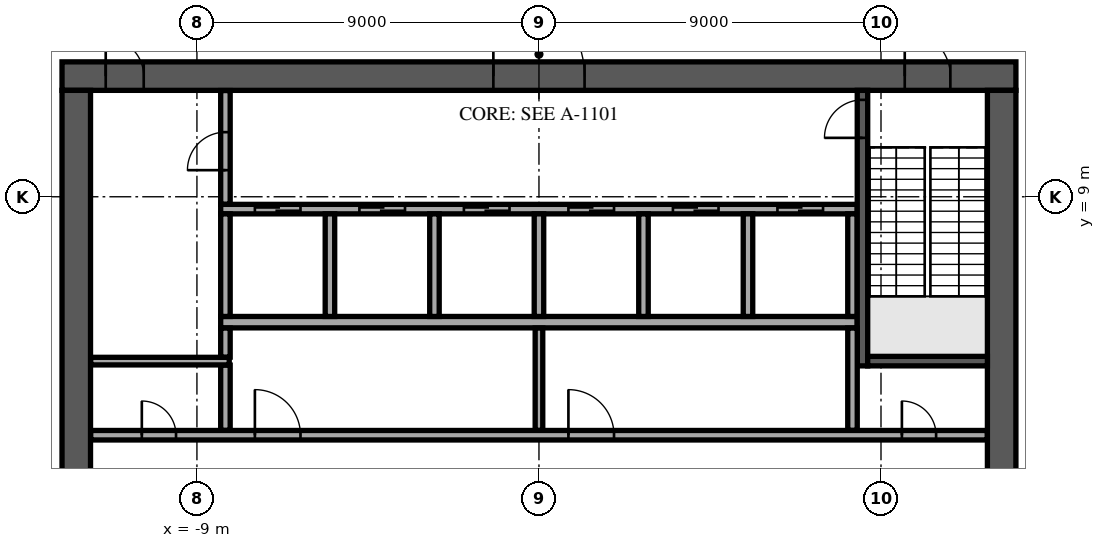
"""IFC4 building model, lengths in metres.
Left out: names, types, materials, properties, quantities, classifications, styles, units other than length and angle.
Written with IfcOpenShell. Run it as: python <this file> out.ifc"""

import sys

from ifc_helpers import new_model, si_unit, direction, frame, frame_2d, origin, place, context, subcontext, project, spatial, rectangle, extrude, element, fill, save


model = new_model("IFC4")
c1 = context("Model", 3, precision=1e-05, world=origin(), true_north=direction((0.0, 1.0)))
c2 = subcontext(c1, "Body", "Model", "MODEL_VIEW")
j1 = project(units=[si_unit("LENGTHUNIT", "METRE"), si_unit("PLANEANGLEUNIT", "RADIAN")], contexts=[c1])
p1 = place(None, origin())
s1 = spatial("IfcSite", under=j1, at=p1, CompositionType="ELEMENT")
p2 = place(p1, origin())
s2 = spatial("IfcBuilding", under=s1, at=p2, CompositionType="ELEMENT")
p3 = place(p2, frame((0.0, 0.0, 290.9)))
s3 = spatial("IfcBuildingStorey", under=s2, at=p3, CompositionType="ELEMENT", Elevation=290.9)
p4 = place(p3, frame((-12.55, 12.175, 0.0), z_axis=(0.0, 0.0, 1.0), x_axis=(1.0, 0.0, 0.0)))
e1 = element("IfcWall", 1, at=p4, inside=s3, PredefinedType="SHEAR", context=c2, shape_type="SweptSolid", body=[
    extrude(rectangle(XDim=25.1, YDim=0.75, at=frame_2d((12.55, 0.0))), origin(), (0.0, 0.0, 1.0), 5.25),
])
p5 = place(p4, frame((11.35, 0.0, 0.0)))
e2 = element("IfcOpeningElement", 2, at=p5, cuts=e1, PredefinedType="OPENING", context=c2, shape_type="SweptSolid", body=[
    extrude(rectangle(XDim=2.4, YDim=2.4, at=frame_2d((1.2, 1.2))), frame((0.0, 0.385, 0.0), z_axis=(0.0, -1.0, 0.0), x_axis=(1.0, 0.0, 0.0)), (0.0, 0.0, 1.0), 0.77),
])
p6 = place(p4, frame((22.175, 0.0, 0.0)))
e3 = element("IfcOpeningElement", 3, at=p6, cuts=e1, PredefinedType="OPENING", context=c2, shape_type="SweptSolid", body=[
    extrude(rectangle(XDim=1.2, YDim=2.1, at=frame_2d((0.6, 1.05))), frame((0.0, 0.385, 0.0), z_axis=(0.0, -1.0, 0.0), x_axis=(1.0, 0.0, 0.0)), (0.0, 0.0, 1.0), 0.77),
])
p7 = place(p4, frame((1.15, 0.0, 0.0)))
e4 = element("IfcOpeningElement", 4, at=p7, cuts=e1, PredefinedType="OPENING", context=c2, shape_type="SweptSolid", body=[
    extrude(rectangle(XDim=1.0, YDim=2.1, at=frame_2d((0.5, 1.05))), frame((0.0, 0.385, 0.0), z_axis=(0.0, -1.0, 0.0), x_axis=(1.0, 0.0, 0.0)), (0.0, 0.0, 1.0), 0.77),
])
p8 = place(p3, frame((12.175, -11.8, 0.0), z_axis=(0.0, 0.0, 1.0), x_axis=(0.0, 1.0, 0.0)))
e5 = element("IfcWall", 5, at=p8, inside=s3, PredefinedType="SHEAR", context=c2, shape_type="SweptSolid", body=[
    extrude(rectangle(XDim=23.6, YDim=0.75, at=frame_2d((11.8, 0.0))), origin(), (0.0, 0.0, 1.0), 5.25),
])
p9 = place(p8, frame((10.6, 0.0, 0.0)))
e6 = element("IfcOpeningElement", 6, at=p9, cuts=e5, PredefinedType="OPENING", context=c2, shape_type="SweptSolid", body=[
    extrude(rectangle(XDim=2.4, YDim=2.4, at=frame_2d((1.2, 1.2))), frame((0.0, 0.385, 0.0), z_axis=(0.0, -1.0, 0.0), x_axis=(1.0, 0.0, 0.0)), (0.0, 0.0, 1.0), 0.77),
])
p10 = place(p3, frame((-12.175, -11.8, 0.0), z_axis=(0.0, 0.0, 1.0), x_axis=(0.0, 1.0, 0.0)))
e7 = element("IfcWall", 7, at=p10, inside=s3, PredefinedType="SHEAR", context=c2, shape_type="SweptSolid", body=[
    extrude(rectangle(XDim=23.6, YDim=0.75, at=frame_2d((11.8, 0.0))), origin(), (0.0, 0.0, 1.0), 5.25),
])
p11 = place(p10, frame((10.6, 0.0, 0.0)))
e8 = element("IfcOpeningElement", 8, at=p11, cuts=e7, PredefinedType="OPENING", context=c2, shape_type="SweptSolid", body=[
    extrude(rectangle(XDim=2.4, YDim=2.4, at=frame_2d((1.2, 1.2))), frame((0.0, 0.385, 0.0), z_axis=(0.0, -1.0, 0.0), x_axis=(1.0, 0.0, 0.0)), (0.0, 0.0, 1.0), 0.77),
])
p12 = place(p3, frame((-8.375, 5.7, 0.0), z_axis=(0.0, 0.0, 1.0), x_axis=(1.0, 0.0, 0.0)))
e9 = element("IfcWall", 9, at=p12, inside=s3, PredefinedType="SOLIDWALL", context=c2, shape_type="SweptSolid", body=[
    extrude(rectangle(XDim=16.75, YDim=0.3, at=frame_2d((8.375, 0.0))), origin(), (0.0, 0.0, 1.0), 5.25),
])
p13 = place(p3, frame((-8.375, 8.675, 0.0), z_axis=(0.0, 0.0, 1.0), x_axis=(1.0, 0.0, 0.0)))
e10 = element("IfcWall", 10, at=p13, inside=s3, PredefinedType="SOLIDWALL", context=c2, shape_type="SweptSolid", body=[
    extrude(rectangle(XDim=16.75, YDim=0.25, at=frame_2d((8.375, 0.0))), origin(), (0.0, 0.0, 1.0), 5.25),
])
p14 = place(p13, frame((0.9, 0.0, 0.0)))
e11 = element("IfcOpeningElement", 11, at=p14, cuts=e10, PredefinedType="OPENING", context=c2, shape_type="SweptSolid", body=[
    extrude(rectangle(XDim=1.2, YDim=2.1, at=frame_2d((0.6, 1.05))), frame((0.0, 0.135, 0.0), z_axis=(0.0, -1.0, 0.0), x_axis=(1.0, 0.0, 0.0)), (0.0, 0.0, 1.0), 0.27),
])
p15 = place(p13, frame((3.65, 0.0, 0.0)))
e12 = element("IfcOpeningElement", 12, at=p15, cuts=e10, PredefinedType="OPENING", context=c2, shape_type="SweptSolid", body=[
    extrude(rectangle(XDim=1.2, YDim=2.1, at=frame_2d((0.6, 1.05))), frame((0.0, 0.135, 0.0), z_axis=(0.0, -1.0, 0.0), x_axis=(1.0, 0.0, 0.0)), (0.0, 0.0, 1.0), 0.27),
])
p16 = place(p13, frame((6.4, 0.0, 0.0)))
e13 = element("IfcOpeningElement", 13, at=p16, cuts=e10, PredefinedType="OPENING", context=c2, shape_type="SweptSolid", body=[
    extrude(rectangle(XDim=1.2, YDim=2.1, at=frame_2d((0.6, 1.05))), frame((0.0, 0.135, 0.0), z_axis=(0.0, -1.0, 0.0), x_axis=(1.0, 0.0, 0.0)), (0.0, 0.0, 1.0), 0.27),
])
p17 = place(p13, frame((9.15, 0.0, 0.0)))
e14 = element("IfcOpeningElement", 14, at=p17, cuts=e10, PredefinedType="OPENING", context=c2, shape_type="SweptSolid", body=[
    extrude(rectangle(XDim=1.2, YDim=2.1, at=frame_2d((0.6, 1.05))), frame((0.0, 0.135, 0.0), z_axis=(0.0, -1.0, 0.0), x_axis=(1.0, 0.0, 0.0)), (0.0, 0.0, 1.0), 0.27),
])
p18 = place(p13, frame((11.9, 0.0, 0.0)))
e15 = element("IfcOpeningElement", 15, at=p18, cuts=e10, PredefinedType="OPENING", context=c2, shape_type="SweptSolid", body=[
    extrude(rectangle(XDim=1.2, YDim=2.1, at=frame_2d((0.6, 1.05))), frame((0.0, 0.135, 0.0), z_axis=(0.0, -1.0, 0.0), x_axis=(1.0, 0.0, 0.0)), (0.0, 0.0, 1.0), 0.27),
])
p19 = place(p13, frame((14.65, 0.0, 0.0)))
e16 = element("IfcOpeningElement", 16, at=p19, cuts=e10, PredefinedType="OPENING", context=c2, shape_type="SweptSolid", body=[
    extrude(rectangle(XDim=1.2, YDim=2.1, at=frame_2d((0.6, 1.05))), frame((0.0, 0.135, 0.0), z_axis=(0.0, -1.0, 0.0), x_axis=(1.0, 0.0, 0.0)), (0.0, 0.0, 1.0), 0.27),
])
for number, where, z_axis, x_axis in (
    (17, (-8.25, 5.85, 0.0), (0.0, 0.0, 1.0), (0.0, 1.0, 0.0)),
    (18, (-5.5, 5.85, 0.0), (0.0, 0.0, 1.0), (0.0, 1.0, 0.0)),
    (19, (-2.75, 5.85, 0.0), (0.0, 0.0, 1.0), (0.0, 1.0, 0.0)),
    (20, (0.0, 5.85, 0.0), (0.0, 0.0, 1.0), (0.0, 1.0, 0.0)),
    (21, (2.75, 5.85, 0.0), (0.0, 0.0, 1.0), (0.0, 1.0, 0.0)),
    (22, (5.5, 5.85, 0.0), (0.0, 0.0, 1.0), (0.0, 1.0, 0.0)),
    (23, (8.25, 5.85, 0.0), (0.0, 0.0, 1.0), (0.0, 1.0, 0.0)),
):
    element("IfcWall", number, at=place(p3, frame(where, z_axis=z_axis, x_axis=x_axis)), inside=s3, PredefinedType="SOLIDWALL", context=c2, shape_type="SweptSolid", body=[
        extrude(rectangle(XDim=2.7, YDim=0.25, at=frame_2d((1.35, 0.0))), origin(), (0.0, 0.0, 1.0), 5.25),
    ])
p20 = place(p3, frame((8.512, 4.55, 0.0), z_axis=(0.0, 0.0, 1.0), x_axis=(0.0, 1.0, 0.0)))
e24 = element("IfcWall", 24, at=p20, inside=s3, PredefinedType="SOLIDWALL", context=c2, shape_type="SweptSolid", body=[
    extrude(rectangle(XDim=7.25, YDim=0.275, at=frame_2d((3.625, 0.0))), origin(), (0.0, 0.0, 1.0), 5.25),
])
p21 = place(p20, frame((6.0, 0.0, 0.0)))
e25 = element("IfcOpeningElement", 25, at=p21, cuts=e24, PredefinedType="OPENING", context=c2, shape_type="SweptSolid", body=[
    extrude(rectangle(XDim=1.0, YDim=2.1, at=frame_2d((0.5, 1.05))), frame((0.0, 0.147, 0.0), z_axis=(0.0, -1.0, 0.0), x_axis=(1.0, 0.0, 0.0)), (0.0, 0.0, 1.0), 0.295),
])
p22 = place(p3, frame((8.65, 4.675, 0.0), z_axis=(0.0, 0.0, 1.0), x_axis=(1.0, 0.0, 0.0)))
e26 = element("IfcWall", 26, at=p22, inside=s3, PredefinedType="SOLIDWALL", context=c2, shape_type="SweptSolid", body=[
    extrude(rectangle(XDim=3.15, YDim=0.25, at=frame_2d((1.575, 0.0))), origin(), (0.0, 0.0, 1.0), 5.25),
])
p23 = place(p3, frame((-11.795, 2.725, 0.0), z_axis=(0.0, 0.0, 1.0), x_axis=(1.0, 0.0, 0.0)))
e27 = element("IfcWall", 27, at=p23, inside=s3, PredefinedType="PARTITIONING", context=c2, shape_type="SweptSolid", body=[
    extrude(rectangle(XDim=23.59, YDim=0.25, at=frame_2d((11.795, 0.0))), origin(), (0.0, 0.0, 1.0), 5.25),
])
p24 = place(p23, frame((21.345, 0.0, 0.0)))
e28 = element("IfcOpeningElement", 28, at=p24, cuts=e27, PredefinedType="OPENING", context=c2, shape_type="SweptSolid", body=[
    extrude(rectangle(XDim=0.9, YDim=2.1, at=frame_2d((0.45, 1.05))), frame((0.0, 0.135, 0.0), z_axis=(0.0, -1.0, 0.0), x_axis=(1.0, 0.0, 0.0)), (0.0, 0.0, 1.0), 0.27),
])
p25 = place(p23, frame((1.345, 0.0, 0.0)))
e29 = element("IfcOpeningElement", 29, at=p25, cuts=e27, PredefinedType="OPENING", context=c2, shape_type="SweptSolid", body=[
    extrude(rectangle(XDim=0.9, YDim=2.1, at=frame_2d((0.45, 1.05))), frame((0.0, 0.135, 0.0), z_axis=(0.0, -1.0, 0.0), x_axis=(1.0, 0.0, 0.0)), (0.0, 0.0, 1.0), 0.27),
])
p26 = place(p23, frame((4.32, 0.0, 0.0)))
e30 = element("IfcOpeningElement", 30, at=p26, cuts=e27, PredefinedType="OPENING", context=c2, shape_type="SweptSolid", body=[
    extrude(rectangle(XDim=1.2, YDim=2.1, at=frame_2d((0.6, 1.05))), frame((0.0, 0.135, 0.0), z_axis=(0.0, -1.0, 0.0), x_axis=(1.0, 0.0, 0.0)), (0.0, 0.0, 1.0), 0.27),
])
p27 = place(p23, frame((12.57, 0.0, 0.0)))
e31 = element("IfcOpeningElement", 31, at=p27, cuts=e27, PredefinedType="OPENING", context=c2, shape_type="SweptSolid", body=[
    extrude(rectangle(XDim=1.2, YDim=2.1, at=frame_2d((0.6, 1.05))), frame((0.0, 0.135, 0.0), z_axis=(0.0, -1.0, 0.0), x_axis=(1.0, 0.0, 0.0)), (0.0, 0.0, 1.0), 0.27),
])
p28 = place(p3, frame((-8.25, 2.855, 0.0), z_axis=(0.0, 0.0, 1.0), x_axis=(0.0, 1.0, 0.0)))
e32 = element("IfcWall", 32, at=p28, inside=s3, PredefinedType="PARTITIONING", context=c2, shape_type="SweptSolid", body=[
    extrude(rectangle(XDim=1.715, YDim=0.25, at=frame_2d((0.857, 0.0))), origin(), (0.0, 0.0, 1.0), 5.25),
])
p29 = place(p3, frame((0.0, 2.855, 0.0), z_axis=(0.0, 0.0, 1.0), x_axis=(0.0, 1.0, 0.0)))
e33 = element("IfcWall", 33, at=p29, inside=s3, PredefinedType="PARTITIONING", context=c2, shape_type="SweptSolid", body=[
    extrude(rectangle(XDim=2.69, YDim=0.2, at=frame_2d((1.345, 0.0))), origin(), (0.0, 0.0, 1.0), 5.25),
])
p30 = place(p3, frame((8.25, 2.855, 0.0), z_axis=(0.0, 0.0, 1.0), x_axis=(0.0, 1.0, 0.0)))
e34 = element("IfcWall", 34, at=p30, inside=s3, PredefinedType="PARTITIONING", context=c2, shape_type="SweptSolid", body=[
    extrude(rectangle(XDim=2.69, YDim=0.25, at=frame_2d((1.345, 0.0))), origin(), (0.0, 0.0, 1.0), 5.25),
])
p31 = place(p3, frame((-11.795, 4.675, 0.0), z_axis=(0.0, 0.0, 1.0), x_axis=(1.0, 0.0, 0.0)))
e35 = element("IfcWall", 35, at=p31, inside=s3, PredefinedType="PARTITIONING", context=c2, shape_type="SweptSolid", body=[
    extrude(rectangle(XDim=3.645, YDim=0.2, at=frame_2d((1.823, 0.0))), origin(), (0.0, 0.0, 1.0), 5.25),
])
p32 = place(p3, frame((-8.25, 4.78, 0.0), z_axis=(0.0, 0.0, 1.0), x_axis=(0.0, 1.0, 0.0)))
e36 = element("IfcWall", 36, at=p32, inside=s3, PredefinedType="PARTITIONING", context=c2, shape_type="SweptSolid", body=[
    extrude(rectangle(XDim=0.765, YDim=0.25, at=frame_2d((0.382, 0.0))), origin(), (0.0, 0.0, 1.0), 5.25),
])
p33 = place(p3, frame((-8.25, 8.805, 0.0), z_axis=(0.0, 0.0, 1.0), x_axis=(0.0, 1.0, 0.0)))
e37 = element("IfcWall", 37, at=p33, inside=s3, PredefinedType="PARTITIONING", context=c2, shape_type="SweptSolid", body=[
    extrude(rectangle(XDim=2.99, YDim=0.25, at=frame_2d((1.495, 0.0))), origin(), (0.0, 0.0, 1.0), 5.25),
])
p34 = place(p33, frame((0.895, 0.0, 0.0)))
e38 = element("IfcOpeningElement", 38, at=p34, cuts=e37, PredefinedType="OPENING", context=c2, shape_type="SweptSolid", body=[
    extrude(rectangle(XDim=1.0, YDim=2.1, at=frame_2d((0.5, 1.05))), frame((0.0, 0.135, 0.0), z_axis=(0.0, -1.0, 0.0), x_axis=(1.0, 0.0, 0.0)), (0.0, 0.0, 1.0), 0.27),
])
p35 = place(p3, frame((-10.854, 32.094, 0.0), z_axis=(0.0, 0.0, 1.0), x_axis=(-0.422619760964, -0.906307087936, 0.0)))
e39 = element("IfcWall", 39, at=p35, inside=s3, PredefinedType="STANDARD", context=c2, shape_type="SweptSolid", body=[
    extrude(rectangle(XDim=32.447, YDim=0.6, at=frame_2d((16.223, 0.0))), origin(), (0.0, 0.0, 1.0), 5.25),
])
p36 = place(p35, frame((1.22, 0.0, 0.6)))
e40 = element("IfcOpeningElement", 40, at=p36, cuts=e39, PredefinedType="OPENING", context=c2, shape_type="SweptSolid", body=[
    extrude(rectangle(XDim=2.0, YDim=4.2, at=frame_2d((1.0, 2.1))), frame((0.0, 0.31, 0.0), z_axis=(0.0, -1.0, 0.0), x_axis=(1.0, 0.0, 0.0)), (0.0, 0.0, 1.0), 0.62),
])
p37 = place(p5, origin())
e41 = element("IfcDoor", 41, at=p37, inside=s3, OperationType="SINGLE_SWING_LEFT", PredefinedType="DOOR", context=c2, shape_type="SweptSolid", body=[
    extrude(rectangle(XDim=2.4, YDim=2.4, at=frame_2d((1.2, 1.2))), frame((0.0, 0.025, 0.0), z_axis=(0.0, -1.0, 0.0), x_axis=(1.0, 0.0, 0.0)), (0.0, 0.0, 1.0), 0.05),
])
fill(e2, e41)
p38 = place(p6, origin())
e42 = element("IfcDoor", 42, at=p38, inside=s3, OperationType="SINGLE_SWING_LEFT", PredefinedType="DOOR", context=c2, shape_type="SweptSolid", body=[
    extrude(rectangle(XDim=1.2, YDim=2.1, at=frame_2d((0.6, 1.05))), frame((0.0, 0.025, 0.0), z_axis=(0.0, -1.0, 0.0), x_axis=(1.0, 0.0, 0.0)), (0.0, 0.0, 1.0), 0.05),
])
fill(e3, e42)
p39 = place(p7, origin())
e43 = element("IfcDoor", 43, at=p39, inside=s3, OperationType="SINGLE_SWING_LEFT", PredefinedType="DOOR", context=c2, shape_type="SweptSolid", body=[
    extrude(rectangle(XDim=1.0, YDim=2.1, at=frame_2d((0.5, 1.05))), frame((0.0, 0.025, 0.0), z_axis=(0.0, -1.0, 0.0), x_axis=(1.0, 0.0, 0.0)), (0.0, 0.0, 1.0), 0.05),
])
fill(e4, e43)
p40 = place(p14, origin())
e44 = element("IfcDoor", 44, at=p40, inside=s3, OperationType="DOUBLE_DOOR_SLIDING", PredefinedType="DOOR", context=c2, shape_type="SweptSolid", body=[
    extrude(rectangle(XDim=1.2, YDim=2.1, at=frame_2d((0.6, 1.05))), frame((0.0, 0.025, 0.0), z_axis=(0.0, -1.0, 0.0), x_axis=(1.0, 0.0, 0.0)), (0.0, 0.0, 1.0), 0.05),
])
fill(e11, e44)
p41 = place(p15, origin())
e45 = element("IfcDoor", 45, at=p41, inside=s3, OperationType="DOUBLE_DOOR_SLIDING", PredefinedType="DOOR", context=c2, shape_type="SweptSolid", body=[
    extrude(rectangle(XDim=1.2, YDim=2.1, at=frame_2d((0.6, 1.05))), frame((0.0, 0.025, 0.0), z_axis=(0.0, -1.0, 0.0), x_axis=(1.0, 0.0, 0.0)), (0.0, 0.0, 1.0), 0.05),
])
fill(e12, e45)
p42 = place(p16, origin())
e46 = element("IfcDoor", 46, at=p42, inside=s3, OperationType="DOUBLE_DOOR_SLIDING", PredefinedType="DOOR", context=c2, shape_type="SweptSolid", body=[
    extrude(rectangle(XDim=1.2, YDim=2.1, at=frame_2d((0.6, 1.05))), frame((0.0, 0.025, 0.0), z_axis=(0.0, -1.0, 0.0), x_axis=(1.0, 0.0, 0.0)), (0.0, 0.0, 1.0), 0.05),
])
fill(e13, e46)
p43 = place(p17, origin())
e47 = element("IfcDoor", 47, at=p43, inside=s3, OperationType="DOUBLE_DOOR_SLIDING", PredefinedType="DOOR", context=c2, shape_type="SweptSolid", body=[
    extrude(rectangle(XDim=1.2, YDim=2.1, at=frame_2d((0.6, 1.05))), frame((0.0, 0.025, 0.0), z_axis=(0.0, -1.0, 0.0), x_axis=(1.0, 0.0, 0.0)), (0.0, 0.0, 1.0), 0.05),
])
fill(e14, e47)
p44 = place(p18, origin())
e48 = element("IfcDoor", 48, at=p44, inside=s3, OperationType="DOUBLE_DOOR_SLIDING", PredefinedType="DOOR", context=c2, shape_type="SweptSolid", body=[
    extrude(rectangle(XDim=1.2, YDim=2.1, at=frame_2d((0.6, 1.05))), frame((0.0, 0.025, 0.0), z_axis=(0.0, -1.0, 0.0), x_axis=(1.0, 0.0, 0.0)), (0.0, 0.0, 1.0), 0.05),
])
fill(e15, e48)
p45 = place(p19, origin())
e49 = element("IfcDoor", 49, at=p45, inside=s3, OperationType="DOUBLE_DOOR_SLIDING", PredefinedType="DOOR", context=c2, shape_type="SweptSolid", body=[
    extrude(rectangle(XDim=1.2, YDim=2.1, at=frame_2d((0.6, 1.05))), frame((0.0, 0.025, 0.0), z_axis=(0.0, -1.0, 0.0), x_axis=(1.0, 0.0, 0.0)), (0.0, 0.0, 1.0), 0.05),
])
fill(e16, e49)
p46 = place(p21, origin())
e50 = element("IfcDoor", 50, at=p46, inside=s3, OperationType="SINGLE_SWING_LEFT", PredefinedType="DOOR", context=c2, shape_type="SweptSolid", body=[
    extrude(rectangle(XDim=1.0, YDim=2.1, at=frame_2d((0.5, 1.05))), frame((0.0, 0.025, 0.0), z_axis=(0.0, -1.0, 0.0), x_axis=(1.0, 0.0, 0.0)), (0.0, 0.0, 1.0), 0.05),
])
fill(e25, e50)
p47 = place(p24, origin())
e51 = element("IfcDoor", 51, at=p47, inside=s3, OperationType="SINGLE_SWING_RIGHT", PredefinedType="DOOR", context=c2, shape_type="SweptSolid", body=[
    extrude(rectangle(XDim=0.9, YDim=2.1, at=frame_2d((0.45, 1.05))), frame((0.0, 0.025, 0.0), z_axis=(0.0, -1.0, 0.0), x_axis=(1.0, 0.0, 0.0)), (0.0, 0.0, 1.0), 0.05),
])
fill(e28, e51)
p48 = place(p25, origin())
e52 = element("IfcDoor", 52, at=p48, inside=s3, OperationType="SINGLE_SWING_RIGHT", PredefinedType="DOOR", context=c2, shape_type="SweptSolid", body=[
    extrude(rectangle(XDim=0.9, YDim=2.1, at=frame_2d((0.45, 1.05))), frame((0.0, 0.025, 0.0), z_axis=(0.0, -1.0, 0.0), x_axis=(1.0, 0.0, 0.0)), (0.0, 0.0, 1.0), 0.05),
])
fill(e29, e52)
p49 = place(p34, origin())
e53 = element("IfcDoor", 53, at=p49, inside=s3, OperationType="SINGLE_SWING_RIGHT", PredefinedType="DOOR", context=c2, shape_type="SweptSolid", body=[
    extrude(rectangle(XDim=1.0, YDim=2.1, at=frame_2d((0.5, 1.05))), frame((0.0, 0.025, 0.0), z_axis=(0.0, -1.0, 0.0), x_axis=(1.0, 0.0, 0.0)), (0.0, 0.0, 1.0), 0.05),
])
fill(e38, e53)
p50 = place(p26, origin())
e54 = element("IfcDoor", 54, at=p50, inside=s3, OperationType="SINGLE_SWING_LEFT", PredefinedType="DOOR", context=c2, shape_type="SweptSolid", body=[
    extrude(rectangle(XDim=1.2, YDim=2.1, at=frame_2d((0.6, 1.05))), frame((0.0, 0.025, 0.0), z_axis=(0.0, -1.0, 0.0), x_axis=(1.0, 0.0, 0.0)), (0.0, 0.0, 1.0), 0.05),
])
fill(e30, e54)
p51 = place(p27, origin())
e55 = element("IfcDoor", 55, at=p51, inside=s3, OperationType="SINGLE_SWING_LEFT", PredefinedType="DOOR", context=c2, shape_type="SweptSolid", body=[
    extrude(rectangle(XDim=1.2, YDim=2.1, at=frame_2d((0.6, 1.05))), frame((0.0, 0.025, 0.0), z_axis=(0.0, -1.0, 0.0), x_axis=(1.0, 0.0, 0.0)), (0.0, 0.0, 1.0), 0.05),
])
fill(e31, e55)
save(model, sys.argv[1])
